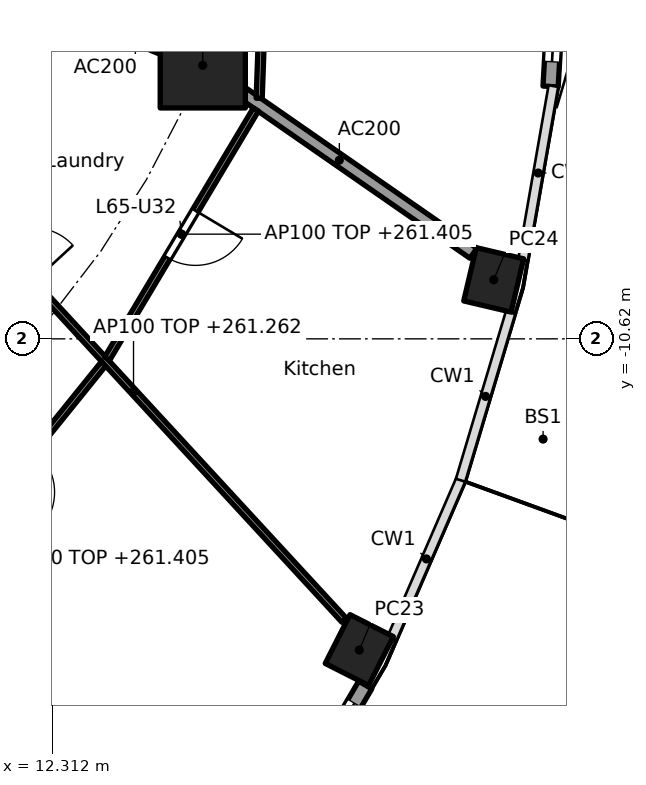
"""IFC4 building model, lengths in metres.
Left out: names, types, materials, properties, quantities, classifications, styles, units other than length and angle.
Written with IfcOpenShell. Run it as: python <this file> out.ifc"""

import sys

from ifc_helpers import new_model, si_unit, direction, frame, frame_2d, origin, origin_2d, place, context, subcontext, project, spatial, rectangle, hollow_rectangle, extrude, element, fill, save


model = new_model("IFC4")
c1 = context("Model", 3, precision=1e-05, world=origin(), true_north=direction((0.0, 1.0)))
c2 = subcontext(c1, "Body", "Model", "MODEL_VIEW")
j1 = project(units=[si_unit("LENGTHUNIT", "METRE"), si_unit("PLANEANGLEUNIT", "RADIAN")], contexts=[c1])
p1 = place(None, origin())
s1 = spatial("IfcSite", under=j1, at=p1, CompositionType="ELEMENT")
p2 = place(p1, origin())
s2 = spatial("IfcBuilding", under=s1, at=p2, CompositionType="ELEMENT")
p3 = place(p2, frame((0.0, 0.0, 258.5)))
s3 = spatial("IfcBuildingStorey", under=s2, at=p3, CompositionType="ELEMENT", Elevation=258.5)
for number, where, z_axis, x_axis in (
    (1, (17.356, -15.738, -0.26), (0.0, 0.0, 1.0), (0.452, 0.892, 0.0)),
    (2, (19.566, -9.65, -0.26), (0.0, 0.0, 1.0), (0.229, 0.973, 0.0)),
):
    element("IfcColumn", number, at=place(p3, frame(where, z_axis=z_axis, x_axis=x_axis)), inside=s3, PredefinedType="COLUMN", context=c2, shape_type="SweptSolid", body=[
        extrude(hollow_rectangle(XDim=0.9, YDim=0.8, WallThickness=0.028, at=origin_2d()), origin(), (0.0, 0.0, 1.0), 3.96),
    ])
p4 = place(p3, frame((14.782, -6.123, 0.0), z_axis=(0.0, 0.0, 1.0), x_axis=(1.0, 0.0, 0.0)))
e3 = element("IfcColumn", 3, at=p4, inside=s3, PredefinedType="COLUMN", context=c2, shape_type="SweptSolid", body=[
    extrude(rectangle(XDim=1.4, YDim=1.4, at=origin_2d()), origin(), (0.0, 0.0, 1.0), 3.7),
])
p5 = place(p3, frame((17.454, -16.312, 0.0), z_axis=(0.0, 0.0, 1.0), x_axis=(-0.506371364425, -0.862315511452, 0.0)))
e4 = element("IfcWall", 4, at=p5, inside=s3, PredefinedType="SOLIDWALL", context=c2, shape_type="SweptSolid", body=[
    extrude(rectangle(XDim=2.796, YDim=0.25, at=frame_2d((1.398, 0.0))), origin(), (0.0, 0.0, 1.0), 3.44),
])
p6 = place(p5, frame((0.348, 0.0, 0.0)))
e5 = element("IfcOpeningElement", 5, at=p6, cuts=e4, PredefinedType="OPENING", context=c2, shape_type="SweptSolid", body=[
    extrude(rectangle(XDim=2.1, YDim=2.4, at=frame_2d((1.05, 1.2))), frame((0.0, 0.135, 0.0), z_axis=(0.0, -1.0, 0.0), x_axis=(1.0, 0.0, 0.0)), (0.0, 0.0, 1.0), 0.27),
])
p7 = place(p3, frame((20.669, -3.56, 0.0), z_axis=(0.0, 0.0, 1.0), x_axis=(-0.057533933376, -0.998343551344, 0.0)))
e6 = element("IfcWall", 6, at=p7, inside=s3, PredefinedType="SOLIDWALL", context=c2, shape_type="SweptSolid", body=[
    extrude(rectangle(XDim=2.915, YDim=0.25, at=frame_2d((1.458, 0.0))), origin(), (0.0, 0.0, 1.0), 3.44),
])
p8 = place(p7, frame((0.408, 0.0, 0.0)))
e7 = element("IfcOpeningElement", 7, at=p8, cuts=e6, PredefinedType="OPENING", context=c2, shape_type="SweptSolid", body=[
    extrude(rectangle(XDim=2.1, YDim=2.4, at=frame_2d((1.05, 1.2))), frame((0.0, 0.135, 0.0), z_axis=(0.0, -1.0, 0.0), x_axis=(1.0, 0.0, 0.0)), (0.0, 0.0, 1.0), 0.27),
])
p9 = place(p3, frame((12.657, -5.243, 0.0), z_axis=(0.0, 0.0, 1.0), x_axis=(0.92383017907, -0.382802560388, 0.0)))
e8 = element("IfcWall", 8, at=p9, inside=s3, PredefinedType="PARTITIONING", context=c2, shape_type="SweptSolid", body=[
    extrude(rectangle(XDim=2.2, YDim=0.2, at=frame_2d((1.1, 0.0))), origin(), (0.0, 0.0, 1.0), 3.44),
])
p10 = place(p3, frame((14.823, -6.151, 0.0), z_axis=(0.0, 0.0, 1.0), x_axis=(0.821435065081, -0.570302054928, 0.0)))
e9 = element("IfcWall", 9, at=p10, inside=s3, PredefinedType="PARTITIONING", context=c2, shape_type="SweptSolid", body=[
    extrude(rectangle(XDim=5.368, YDim=0.2, at=frame_2d((2.684, 0.0))), origin(), (0.0, 0.0, 1.0), 3.44),
])
p11 = place(p3, frame((5.275, -12.494, 0.0), z_axis=(0.0, 0.0, 1.0), x_axis=(0.707106781187, 0.707106781187, 0.0)))
e10 = element("IfcWall", 10, at=p11, inside=s3, PredefinedType="PARTITIONING", context=c2, shape_type="SweptSolid", body=[
    extrude(rectangle(XDim=10.409, YDim=0.2, at=frame_2d((5.205, 0.0))), origin(), (0.0, 0.0, 1.0), 3.44),
])
p12 = place(p11, frame((4.604, 0.0, 0.0)))
e11 = element("IfcOpeningElement", 11, at=p12, cuts=e10, PredefinedType="OPENING", context=c2, shape_type="SweptSolid", body=[
    extrude(rectangle(XDim=1.0, YDim=2.1, at=frame_2d((0.5, 1.05))), frame((0.0, 0.11, 0.0), z_axis=(0.0, -1.0, 0.0), x_axis=(1.0, 0.0, 0.0)), (0.0, 0.0, 1.0), 0.22),
])
p13 = place(p3, frame((15.865, -2.338, 0.0), z_axis=(0.0, 0.0, 1.0), x_axis=(-0.035864509465, -0.999356661538, 0.0)))
e12 = element("IfcWall", 12, at=p13, inside=s3, PredefinedType="PARTITIONING", context=c2, shape_type="SweptSolid", body=[
    extrude(rectangle(XDim=4.329, YDim=0.1, at=frame_2d((2.165, 0.0))), origin(), (0.0, 0.0, 1.0), 2.905),
])
p14 = place(p3, frame((10.304, -14.555, 0.0), z_axis=(0.0, 0.0, 1.0), x_axis=(0.628170338674, 0.778075848237, 0.0)))
e13 = element("IfcWall", 13, at=p14, inside=s3, PredefinedType="PARTITIONING", context=c2, shape_type="SweptSolid", body=[
    extrude(rectangle(XDim=4.532, YDim=0.1, at=frame_2d((2.266, 0.0))), origin(), (0.0, 0.0, 1.0), 2.905),
])
p15 = place(p14, frame((1.816, 0.0, 0.0)))
e14 = element("IfcOpeningElement", 14, at=p15, cuts=e13, PredefinedType="OPENING", context=c2, shape_type="SweptSolid", body=[
    extrude(rectangle(XDim=0.9, YDim=2.1, at=frame_2d((0.45, 1.05))), frame((0.0, 0.06, 0.0), z_axis=(0.0, -1.0, 0.0), x_axis=(1.0, 0.0, 0.0)), (0.0, 0.0, 1.0), 0.12),
])
p16 = place(p3, frame((10.179, -7.731, 0.0), z_axis=(0.0, 0.0, 1.0), x_axis=(0.67775318564, -0.73528947997, 0.0)))
e15 = element("IfcWall", 15, at=p16, inside=s3, PredefinedType="PARTITIONING", context=c2, shape_type="SweptSolid", body=[
    extrude(rectangle(XDim=10.222, YDim=0.1, at=frame_2d((5.111, 0.0))), origin(), (0.0, 0.0, 1.0), 2.762),
])
p17 = place(p16, frame((1.766, 0.0, 0.0)))
e16 = element("IfcOpeningElement", 16, at=p17, cuts=e15, PredefinedType="OPENING", context=c2, shape_type="SweptSolid", body=[
    extrude(rectangle(XDim=0.9, YDim=2.1, at=frame_2d((0.45, 1.05))), frame((0.0, 0.06, 0.0), z_axis=(0.0, -1.0, 0.0), x_axis=(1.0, 0.0, 0.0)), (0.0, 0.0, 1.0), 0.12),
])
p18 = place(p3, frame((13.208, -10.947, 0.0), z_axis=(0.0, 0.0, 1.0), x_axis=(0.512726452516, 0.858552028063, 0.0)))
e17 = element("IfcWall", 17, at=p18, inside=s3, PredefinedType="PARTITIONING", context=c2, shape_type="SweptSolid", body=[
    extrude(rectangle(XDim=4.772, YDim=0.1, at=frame_2d((2.386, 0.0))), origin(), (0.0, 0.0, 1.0), 2.905),
])
p19 = place(p18, frame((1.936, 0.0, 0.0)))
e18 = element("IfcOpeningElement", 18, at=p19, cuts=e17, PredefinedType="OPENING", context=c2, shape_type="SweptSolid", body=[
    extrude(rectangle(XDim=0.9, YDim=2.1, at=frame_2d((0.45, 1.05))), frame((0.0, 0.06, 0.0), z_axis=(0.0, -1.0, 0.0), x_axis=(1.0, 0.0, 0.0)), (0.0, 0.0, 1.0), 0.12),
])
p20 = place(p6, origin())
e19 = element("IfcDoor", 19, at=p20, inside=s3, OperationType="SLIDING_TO_LEFT", PredefinedType="DOOR", context=c2, shape_type="SweptSolid", body=[
    extrude(rectangle(XDim=2.1, YDim=2.4, at=frame_2d((1.05, 1.2))), frame((0.0, 0.025, 0.0), z_axis=(0.0, -1.0, 0.0), x_axis=(1.0, 0.0, 0.0)), (0.0, 0.0, 1.0), 0.05),
])
fill(e5, e19)
p21 = place(p8, origin())
e20 = element("IfcDoor", 20, at=p21, inside=s3, OperationType="SLIDING_TO_LEFT", PredefinedType="DOOR", context=c2, shape_type="SweptSolid", body=[
    extrude(rectangle(XDim=2.1, YDim=2.4, at=frame_2d((1.05, 1.2))), frame((0.0, 0.025, 0.0), z_axis=(0.0, -1.0, 0.0), x_axis=(1.0, 0.0, 0.0)), (0.0, 0.0, 1.0), 0.05),
])
fill(e7, e20)
p22 = place(p19, frame((0.9, 0.0, 0.0), x_axis=(-1.0, 0.0, 0.0)))
e21 = element("IfcDoor", 21, at=p22, inside=s3, OperationType="SINGLE_SWING_LEFT", PredefinedType="DOOR", context=c2, shape_type="SweptSolid", body=[
    extrude(rectangle(XDim=0.9, YDim=2.1, at=frame_2d((0.45, 1.05))), frame((0.0, 0.025, 0.0), z_axis=(0.0, -1.0, 0.0), x_axis=(1.0, 0.0, 0.0)), (0.0, 0.0, 1.0), 0.05),
])
fill(e18, e21)
save(model, sys.argv[1])
